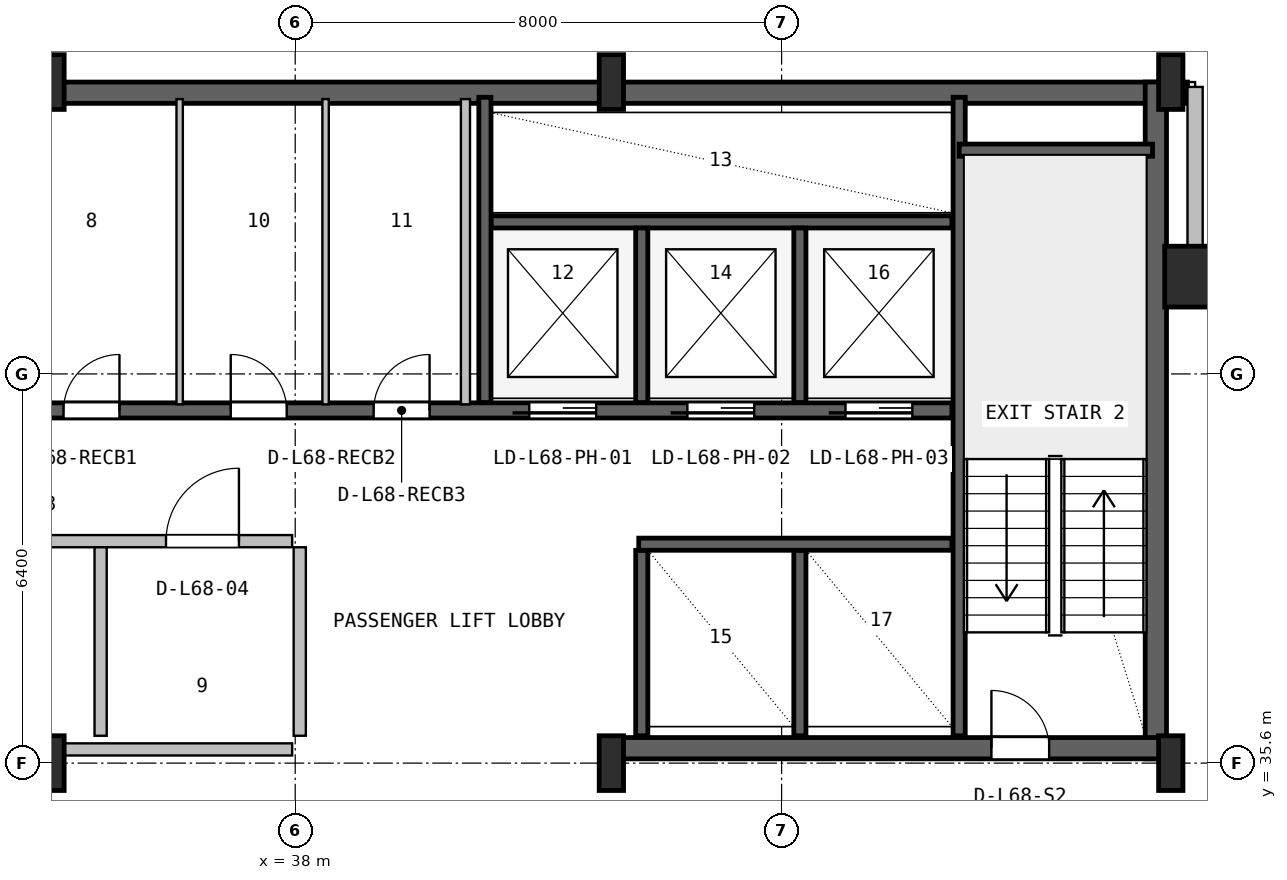
"""IFC4 building model, lengths in metres.
Left out: names, types, materials, properties, quantities, classifications, styles, units other than length and angle.
Written with IfcOpenShell. Run it as: python <this file> out.ifc"""

import sys

from ifc_helpers import new_model, si_unit, direction, frame, frame_2d, origin, origin_2d, place, context, subcontext, project, spatial, rectangle, hollow_rectangle, i_section, extrude, source, transform, mapped, element, fill, save


model = new_model("IFC4")
c1 = context("Model", 3, precision=1e-05, world=origin(), true_north=direction((0.0, 1.0)))
c2 = subcontext(c1, "Body", "Model", "MODEL_VIEW")
j1 = project(units=[si_unit("LENGTHUNIT", "METRE"), si_unit("PLANEANGLEUNIT", "RADIAN")], contexts=[c1])
p1 = place(None, origin())
s1 = spatial("IfcSite", under=j1, at=p1, CompositionType="ELEMENT")
p2 = place(p1, origin())
s2 = spatial("IfcBuilding", under=s1, at=p2, CompositionType="ELEMENT")
p3 = place(p2, frame((0.0, 0.0, 273.6)))
s3 = spatial("IfcBuildingStorey", under=s2, at=p3, CompositionType="ELEMENT", Elevation=273.6)
p4 = place(p3, frame((15.325, 46.625, 0.0), z_axis=(0.0, 0.0, 1.0), x_axis=(1.0, 0.0, 0.0)))
e1 = element("IfcWall", 1, at=p4, inside=s3, PredefinedType="SHEAR", context=c2, shape_type="SweptSolid", body=[
    extrude(rectangle(XDim=37.35, YDim=0.35, at=frame_2d((18.675, 0.0))), origin(), (0.0, 0.0, 1.0), 3.55),
])
p5 = place(p3, frame((52.155, 35.67, 0.0), z_axis=(0.0, 0.0, 1.0), x_axis=(0.0, 1.0, 0.0)))
e2 = element("IfcWall", 2, at=p5, inside=s3, PredefinedType="SHEAR", context=c2, shape_type="SweptSolid", body=[
    extrude(rectangle(XDim=11.13, YDim=0.35, at=frame_2d((5.565, 0.0))), origin(), (0.0, 0.0, 1.0), 3.55),
])
p6 = place(p3, frame((43.2, 35.845, 0.0), z_axis=(0.0, 0.0, 1.0), x_axis=(1.0, 0.0, 0.0)))
e3 = element("IfcWall", 3, at=p6, inside=s3, PredefinedType="SHEAR", context=c2, shape_type="SweptSolid", body=[
    extrude(rectangle(XDim=9.13, YDim=0.35, at=frame_2d((4.565, 0.0))), origin(), (0.0, 0.0, 1.0), 3.55),
])
p7 = place(p6, frame((6.25, 0.0, 0.0)))
e4 = element("IfcOpeningElement", 4, at=p7, cuts=e3, PredefinedType="OPENING", context=c2, shape_type="SweptSolid", body=[
    extrude(rectangle(XDim=0.95, YDim=2.1, at=frame_2d((0.475, 1.05))), frame((0.0, 0.185, 0.0), z_axis=(0.0, -1.0, 0.0), x_axis=(1.0, 0.0, 0.0)), (0.0, 0.0, 1.0), 0.37),
])
m1 = source(origin(), c2, "Body", "SweptSolid", [
    extrude(i_section(OverallWidth=0.4, OverallDepth=0.9, WebThickness=0.016, FlangeThickness=0.028, FilletRadius=0.016, at=origin_2d()), origin(), (0.0, 0.0, 1.0), 3.8),
])
for number, where, z_axis, x_axis in (
    (5, (34.0, 35.6, 0.0), (0.0, 0.0, 1.0), (1.0, 0.0, 0.0)),
    (6, (34.0, 46.8, 0.0), (0.0, 0.0, 1.0), (1.0, 0.0, 0.0)),
    (7, (43.2, 35.6, 0.0), (0.0, 0.0, 1.0), (1.0, 0.0, 0.0)),
    (8, (43.2, 46.8, 0.0), (0.0, 0.0, 1.0), (1.0, 0.0, 0.0)),
    (9, (52.4, 35.6, 0.0), (0.0, 0.0, 1.0), (1.0, 0.0, 0.0)),
    (10, (52.4, 46.8, 0.0), (0.0, 0.0, 1.0), (1.0, 0.0, 0.0)),
):
    element("IfcColumn", number, at=place(p3, frame(where, z_axis=z_axis, x_axis=x_axis)), inside=s3, PredefinedType="COLUMN", context=c2, shape_type="MappedRepresentation", body=[
        mapped(m1, transform((0.0, 0.0, 0.0), x_axis=(1.0, 0.0, 0.0), y_axis=(0.0, 1.0, 0.0), z_axis=(0.0, 0.0, 1.0), scale=1.0)),
    ])
m2 = source(origin(), c2, "Body", "SweptSolid", [
    extrude(hollow_rectangle(XDim=1.0, YDim=1.0, WallThickness=0.04, at=origin_2d()), origin(), (0.0, 0.0, 1.0), 3.8),
])
p8 = place(p3, frame((52.8, 43.6, 0.0), z_axis=(0.0, 0.0, 1.0), x_axis=(1.0, 0.0, 0.0)))
e11 = element("IfcColumn", 11, at=p8, inside=s3, PredefinedType="COLUMN", context=c2, shape_type="MappedRepresentation", body=[
    mapped(m2, transform((0.0, 0.0, 0.0), x_axis=(1.0, 0.0, 0.0), y_axis=(0.0, 1.0, 0.0), z_axis=(0.0, 0.0, 1.0), scale=1.0)),
])
p9 = place(p3, frame((52.93, 43.6, 0.0), z_axis=(0.0, 0.0, 1.0), x_axis=(1.0, 0.0, 0.0)))
e12 = element("IfcWall", 12, at=p9, inside=s3, PredefinedType="SOLIDWALL", context=c2, shape_type="SweptSolid", body=[
    extrude(rectangle(XDim=2.99, YDim=0.25, at=frame_2d((1.495, 0.0))), origin(), (0.0, 0.0, 1.0), 3.53),
])
p10 = place(p3, frame((52.8, 43.52, 0.0), z_axis=(0.0, 0.0, 1.0), x_axis=(0.0, 1.0, 0.0)))
e13 = element("IfcWall", 13, at=p10, inside=s3, PredefinedType="SOLIDWALL", context=c2, shape_type="SweptSolid", body=[
    extrude(rectangle(XDim=3.2, YDim=0.25, at=frame_2d((1.6, 0.0))), origin(), (0.0, 0.0, 1.0), 3.171),
])
p11 = place(p3, frame((48.92, 36.05, 0.0), z_axis=(0.0, 0.0, 1.0), x_axis=(0.0, 1.0, 0.0)))
e14 = element("IfcWall", 14, at=p11, inside=s3, PredefinedType="SHEAR", context=c2, shape_type="SweptSolid", body=[
    extrude(rectangle(XDim=10.5, YDim=0.2, at=frame_2d((5.25, 0.0))), origin(), (0.0, 0.0, 1.0), 3.55),
])
p12 = place(p3, frame((48.92, 45.68, 0.0), z_axis=(0.0, 0.0, 1.0), x_axis=(1.0, 0.0, 0.0)))
e15 = element("IfcWall", 15, at=p12, inside=s3, PredefinedType="SHEAR", context=c2, shape_type="SweptSolid", body=[
    extrude(rectangle(XDim=3.18, YDim=0.2, at=frame_2d((1.59, 0.0))), origin(), (0.0, 0.0, 1.0), 3.55),
])
p13 = place(p3, frame((24.98, 41.4, 0.0), z_axis=(0.0, 0.0, 1.0), x_axis=(1.0, 0.0, 0.0)))
e16 = element("IfcWall", 16, at=p13, inside=s3, PredefinedType="SHEAR", context=c2, shape_type="SweptSolid", body=[
    extrude(rectangle(XDim=23.82, YDim=0.25, at=frame_2d((11.91, 0.0))), origin(), (0.0, 0.0, 1.0), 3.55),
])
p14 = place(p13, frame((16.87, 0.0, 0.0)))
e17 = element("IfcOpeningElement", 17, at=p14, cuts=e16, PredefinedType="OPENING", context=c2, shape_type="SweptSolid", body=[
    extrude(rectangle(XDim=1.1, YDim=2.18, at=frame_2d((0.55, 1.09))), frame((0.0, 0.135, 0.0), z_axis=(0.0, -1.0, 0.0), x_axis=(1.0, 0.0, 0.0)), (0.0, 0.0, 1.0), 0.27),
])
p15 = place(p13, frame((19.47, 0.0, 0.0)))
e18 = element("IfcOpeningElement", 18, at=p15, cuts=e16, PredefinedType="OPENING", context=c2, shape_type="SweptSolid", body=[
    extrude(rectangle(XDim=1.1, YDim=2.18, at=frame_2d((0.55, 1.09))), frame((0.0, 0.135, 0.0), z_axis=(0.0, -1.0, 0.0), x_axis=(1.0, 0.0, 0.0)), (0.0, 0.0, 1.0), 0.27),
])
p16 = place(p13, frame((22.07, 0.0, 0.0)))
e19 = element("IfcOpeningElement", 19, at=p16, cuts=e16, PredefinedType="OPENING", context=c2, shape_type="SweptSolid", body=[
    extrude(rectangle(XDim=1.1, YDim=2.18, at=frame_2d((0.55, 1.09))), frame((0.0, 0.135, 0.0), z_axis=(0.0, -1.0, 0.0), x_axis=(1.0, 0.0, 0.0)), (0.0, 0.0, 1.0), 0.27),
])
p17 = place(p13, frame((1.81, 0.0, 0.0)))
e20 = element("IfcOpeningElement", 20, at=p17, cuts=e16, PredefinedType="OPENING", context=c2, shape_type="SweptSolid", body=[
    extrude(rectangle(XDim=0.92, YDim=2.08, at=frame_2d((0.46, 1.04))), frame((0.0, 0.135, 0.0), z_axis=(0.0, -1.0, 0.0), x_axis=(1.0, 0.0, 0.0)), (0.0, 0.0, 1.0), 0.27),
])
p18 = place(p13, frame((5.71, 0.0, 0.0)))
e21 = element("IfcOpeningElement", 21, at=p18, cuts=e16, PredefinedType="OPENING", context=c2, shape_type="SweptSolid", body=[
    extrude(rectangle(XDim=0.92, YDim=2.08, at=frame_2d((0.46, 1.04))), frame((0.0, 0.135, 0.0), z_axis=(0.0, -1.0, 0.0), x_axis=(1.0, 0.0, 0.0)), (0.0, 0.0, 1.0), 0.27),
])
p19 = place(p13, frame((9.21, 0.0, 0.0)))
e22 = element("IfcOpeningElement", 22, at=p19, cuts=e16, PredefinedType="OPENING", context=c2, shape_type="SweptSolid", body=[
    extrude(rectangle(XDim=0.92, YDim=2.08, at=frame_2d((0.46, 1.04))), frame((0.0, 0.135, 0.0), z_axis=(0.0, -1.0, 0.0), x_axis=(1.0, 0.0, 0.0)), (0.0, 0.0, 1.0), 0.27),
])
p20 = place(p13, frame((11.96, 0.0, 0.0)))
e23 = element("IfcOpeningElement", 23, at=p20, cuts=e16, PredefinedType="OPENING", context=c2, shape_type="SweptSolid", body=[
    extrude(rectangle(XDim=0.92, YDim=2.08, at=frame_2d((0.46, 1.04))), frame((0.0, 0.135, 0.0), z_axis=(0.0, -1.0, 0.0), x_axis=(1.0, 0.0, 0.0)), (0.0, 0.0, 1.0), 0.27),
])
p21 = place(p13, frame((14.31, 0.0, 0.0)))
e24 = element("IfcOpeningElement", 24, at=p21, cuts=e16, PredefinedType="OPENING", context=c2, shape_type="SweptSolid", body=[
    extrude(rectangle(XDim=0.92, YDim=2.08, at=frame_2d((0.46, 1.04))), frame((0.0, 0.135, 0.0), z_axis=(0.0, -1.0, 0.0), x_axis=(1.0, 0.0, 0.0)), (0.0, 0.0, 1.0), 0.27),
])
p22 = place(p3, frame((41.22, 44.5, 0.0), z_axis=(0.0, 0.0, 1.0), x_axis=(1.0, 0.0, 0.0)))
e25 = element("IfcWall", 25, at=p22, inside=s3, PredefinedType="SHEAR", context=c2, shape_type="SweptSolid", body=[
    extrude(rectangle(XDim=7.58, YDim=0.2, at=frame_2d((3.79, 0.0))), origin(), (0.0, 0.0, 1.0), 3.55),
])
p23 = place(p3, frame((41.12, 41.53, 0.0), z_axis=(0.0, 0.0, 1.0), x_axis=(0.0, 1.0, 0.0)))
e26 = element("IfcWall", 26, at=p23, inside=s3, PredefinedType="SHEAR", context=c2, shape_type="SweptSolid", body=[
    extrude(rectangle(XDim=5.02, YDim=0.2, at=frame_2d((2.51, 0.0))), origin(), (0.0, 0.0, 1.0), 3.55),
])
for number, where, z_axis, x_axis in (
    (27, (43.7, 41.53, 0.0), (0.0, 0.0, 1.0), (0.0, 1.0, 0.0)),
    (28, (46.3, 41.53, 0.0), (0.0, 0.0, 1.0), (0.0, 1.0, 0.0)),
):
    element("IfcWall", number, at=place(p3, frame(where, z_axis=z_axis, x_axis=x_axis)), inside=s3, PredefinedType="SHEAR", context=c2, shape_type="SweptSolid", body=[
        extrude(rectangle(XDim=2.87, YDim=0.2, at=frame_2d((1.435, 0.0))), origin(), (0.0, 0.0, 1.0), 3.55),
    ])
for number, where, z_axis, x_axis in (
    (29, (43.7, 36.05, 0.0), (0.0, 0.0, 1.0), (0.0, 1.0, 0.0)),
    (30, (46.3, 36.05, 0.0), (0.0, 0.0, 1.0), (0.0, 1.0, 0.0)),
):
    element("IfcWall", number, at=place(p3, frame(where, z_axis=z_axis, x_axis=x_axis)), inside=s3, PredefinedType="SHEAR", context=c2, shape_type="SweptSolid", body=[
        extrude(rectangle(XDim=3.05, YDim=0.2, at=frame_2d((1.525, 0.0))), origin(), (0.0, 0.0, 1.0), 3.55),
    ])
p24 = place(p3, frame((43.65, 39.2, 0.0), z_axis=(0.0, 0.0, 1.0), x_axis=(1.0, 0.0, 0.0)))
e31 = element("IfcWall", 31, at=p24, inside=s3, PredefinedType="SHEAR", context=c2, shape_type="SweptSolid", body=[
    extrude(rectangle(XDim=5.15, YDim=0.2, at=frame_2d((2.575, 0.0))), origin(), (0.0, 0.0, 1.0), 3.55),
])
p25 = place(p3, frame((25.0, 35.825, 0.0), z_axis=(0.0, 0.0, 1.0), x_axis=(1.0, 0.0, 0.0)))
e32 = element("IfcWall", 32, at=p25, inside=s3, PredefinedType="SOLIDWALL", context=c2, shape_type="SweptSolid", body=[
    extrude(rectangle(XDim=12.95, YDim=0.2, at=frame_2d((6.475, 0.0))), origin(), (0.0, 0.0, 1.0), 2.575),
])
p26 = place(p3, frame((25.0, 39.25, 0.0), z_axis=(0.0, 0.0, 1.0), x_axis=(1.0, 0.0, 0.0)))
e33 = element("IfcWall", 33, at=p26, inside=s3, PredefinedType="SOLIDWALL", context=c2, shape_type="SweptSolid", body=[
    extrude(rectangle(XDim=12.95, YDim=0.2, at=frame_2d((6.475, 0.0))), origin(), (0.0, 0.0, 1.0), 3.53),
])
p27 = place(p26, frame((1.1, 0.0, 0.0)))
e34 = element("IfcOpeningElement", 34, at=p27, cuts=e33, PredefinedType="OPENING", context=c2, shape_type="SweptSolid", body=[
    extrude(rectangle(XDim=0.9, YDim=2.06, at=frame_2d((0.45, 1.03))), frame((0.0, 0.11, 0.0), z_axis=(0.0, -1.0, 0.0), x_axis=(1.0, 0.0, 0.0)), (0.0, 0.0, 1.0), 0.22),
])
p28 = place(p26, frame((4.5, 0.0, 0.0)))
e35 = element("IfcOpeningElement", 35, at=p28, cuts=e33, PredefinedType="OPENING", context=c2, shape_type="SweptSolid", body=[
    extrude(rectangle(XDim=0.9, YDim=2.06, at=frame_2d((0.45, 1.03))), frame((0.0, 0.11, 0.0), z_axis=(0.0, -1.0, 0.0), x_axis=(1.0, 0.0, 0.0)), (0.0, 0.0, 1.0), 0.22),
])
p29 = place(p26, frame((7.84, 0.0, 0.0)))
e36 = element("IfcOpeningElement", 36, at=p29, cuts=e33, PredefinedType="OPENING", context=c2, shape_type="SweptSolid", body=[
    extrude(rectangle(XDim=0.92, YDim=2.08, at=frame_2d((0.46, 1.04))), frame((0.0, 0.11, 0.0), z_axis=(0.0, -1.0, 0.0), x_axis=(1.0, 0.0, 0.0)), (0.0, 0.0, 1.0), 0.22),
])
p30 = place(p26, frame((10.875, 0.0, 0.0)))
e37 = element("IfcOpeningElement", 37, at=p30, cuts=e33, PredefinedType="OPENING", context=c2, shape_type="SweptSolid", body=[
    extrude(rectangle(XDim=1.2, YDim=2.1, at=frame_2d((0.6, 1.05))), frame((0.0, 0.11, 0.0), z_axis=(0.0, -1.0, 0.0), x_axis=(1.0, 0.0, 0.0)), (0.0, 0.0, 1.0), 0.22),
])
for number, where, z_axis, x_axis in (
    (38, (34.8, 36.05, 0.0), (0.0, 0.0, 1.0), (0.0, 1.0, 0.0)),
    (39, (38.075, 36.05, 0.0), (0.0, 0.0, 1.0), (0.0, 1.0, 0.0)),
):
    element("IfcWall", number, at=place(p3, frame(where, z_axis=z_axis, x_axis=x_axis)), inside=s3, PredefinedType="SOLIDWALL", context=c2, shape_type="SweptSolid", body=[
        extrude(rectangle(XDim=3.1, YDim=0.2, at=frame_2d((1.55, 0.0))), origin(), (0.0, 0.0, 1.0), 3.53),
    ])
for number, where, z_axis, x_axis in (
    (40, (36.1, 41.5, 0.0), (0.0, 0.0, 1.0), (0.0, 1.0, 0.0)),
    (41, (38.5, 41.5, 0.0), (0.0, 0.0, 1.0), (0.0, 1.0, 0.0)),
):
    element("IfcWall", number, at=place(p3, frame(where, z_axis=z_axis, x_axis=x_axis)), inside=s3, PredefinedType="PARTITIONING", context=c2, shape_type="SweptSolid", body=[
        extrude(rectangle(XDim=5.02, YDim=0.105, at=frame_2d((2.51, 0.0))), origin(), (0.0, 0.0, 1.0), 3.53),
    ])
p31 = place(p3, frame((40.8, 41.5, 0.0), z_axis=(0.0, 0.0, 1.0), x_axis=(0.0, 1.0, 0.0)))
e42 = element("IfcWall", 42, at=p31, inside=s3, PredefinedType="PARTITIONING", context=c2, shape_type="SweptSolid", body=[
    extrude(rectangle(XDim=5.02, YDim=0.15, at=frame_2d((2.51, 0.0))), origin(), (0.0, 0.0, 1.0), 3.53),
])
m3 = source(origin(), c2, "Body", "SweptSolid", [
    extrude(rectangle(XDim=0.95, YDim=2.1, at=frame_2d((0.475, 1.05))), frame((0.0, 0.025, 0.0), z_axis=(0.0, -1.0, 0.0), x_axis=(1.0, 0.0, 0.0)), (0.0, 0.0, 1.0), 0.05),
])
p32 = place(p7, origin())
e43 = element("IfcDoor", 43, at=p32, inside=s3, OperationType="SINGLE_SWING_LEFT", PredefinedType="DOOR", context=c2, shape_type="MappedRepresentation", body=[
    mapped(m3, transform((0.0, 0.0, 0.0), x_axis=(1.0, 0.0, 0.0), y_axis=(0.0, 1.0, 0.0), z_axis=(0.0, 0.0, 1.0), scale=1.0)),
])
fill(e4, e43)
m4 = source(origin(), c2, "Body", "SweptSolid", [
    extrude(rectangle(XDim=1.1, YDim=2.18, at=frame_2d((0.55, 1.09))), frame((0.0, 0.025, 0.0), z_axis=(0.0, -1.0, 0.0), x_axis=(1.0, 0.0, 0.0)), (0.0, 0.0, 1.0), 0.05),
])
p33 = place(p14, frame((1.1, 0.0, 0.0), z_axis=(0.0, 0.0, 1.0), x_axis=(-1.0, 0.0, 0.0)))
e44 = element("IfcDoor", 44, at=p33, inside=s3, OperationType="SLIDING_TO_LEFT", PredefinedType="DOOR", context=c2, shape_type="MappedRepresentation", body=[
    mapped(m4, transform((0.0, 0.0, 0.0), x_axis=(1.0, 0.0, 0.0), y_axis=(0.0, 1.0, 0.0), z_axis=(0.0, 0.0, 1.0), scale=1.0)),
])
fill(e17, e44)
p34 = place(p15, frame((1.1, 0.0, 0.0), z_axis=(0.0, 0.0, 1.0), x_axis=(-1.0, 0.0, 0.0)))
e45 = element("IfcDoor", 45, at=p34, inside=s3, OperationType="SLIDING_TO_LEFT", PredefinedType="DOOR", context=c2, shape_type="MappedRepresentation", body=[
    mapped(m4, transform((0.0, 0.0, 0.0), x_axis=(1.0, 0.0, 0.0), y_axis=(0.0, 1.0, 0.0), z_axis=(0.0, 0.0, 1.0), scale=1.0)),
])
fill(e18, e45)
p35 = place(p16, frame((1.1, 0.0, 0.0), z_axis=(0.0, 0.0, 1.0), x_axis=(-1.0, 0.0, 0.0)))
e46 = element("IfcDoor", 46, at=p35, inside=s3, OperationType="SLIDING_TO_LEFT", PredefinedType="DOOR", context=c2, shape_type="MappedRepresentation", body=[
    mapped(m4, transform((0.0, 0.0, 0.0), x_axis=(1.0, 0.0, 0.0), y_axis=(0.0, 1.0, 0.0), z_axis=(0.0, 0.0, 1.0), scale=1.0)),
])
fill(e19, e46)
m5 = source(origin(), c2, "Body", "SweptSolid", [
    extrude(rectangle(XDim=0.92, YDim=2.08, at=frame_2d((0.46, 1.04))), frame((0.0, 0.025, 0.0), z_axis=(0.0, -1.0, 0.0), x_axis=(1.0, 0.0, 0.0)), (0.0, 0.0, 1.0), 0.05),
])
p36 = place(p19, origin())
e47 = element("IfcDoor", 47, at=p36, inside=s3, OperationType="SINGLE_SWING_RIGHT", PredefinedType="DOOR", context=c2, shape_type="MappedRepresentation", body=[
    mapped(m5, transform((0.0, 0.0, 0.0), x_axis=(1.0, 0.0, 0.0), y_axis=(0.0, 1.0, 0.0), z_axis=(0.0, 0.0, 1.0), scale=1.0)),
])
fill(e22, e47)
p37 = place(p20, origin())
e48 = element("IfcDoor", 48, at=p37, inside=s3, OperationType="SINGLE_SWING_LEFT", PredefinedType="DOOR", context=c2, shape_type="MappedRepresentation", body=[
    mapped(m5, transform((0.0, 0.0, 0.0), x_axis=(1.0, 0.0, 0.0), y_axis=(0.0, 1.0, 0.0), z_axis=(0.0, 0.0, 1.0), scale=1.0)),
])
fill(e23, e48)
p38 = place(p21, origin())
e49 = element("IfcDoor", 49, at=p38, inside=s3, OperationType="SINGLE_SWING_RIGHT", PredefinedType="DOOR", context=c2, shape_type="MappedRepresentation", body=[
    mapped(m5, transform((0.0, 0.0, 0.0), x_axis=(1.0, 0.0, 0.0), y_axis=(0.0, 1.0, 0.0), z_axis=(0.0, 0.0, 1.0), scale=1.0)),
])
fill(e24, e49)
m6 = source(origin(), c2, "Body", "SweptSolid", [
    extrude(rectangle(XDim=1.2, YDim=2.1, at=frame_2d((0.6, 1.05))), frame((0.0, 0.025, 0.0), z_axis=(0.0, -1.0, 0.0), x_axis=(1.0, 0.0, 0.0)), (0.0, 0.0, 1.0), 0.05),
])
p39 = place(p30, origin())
e50 = element("IfcDoor", 50, at=p39, inside=s3, OperationType="SINGLE_SWING_RIGHT", PredefinedType="DOOR", context=c2, shape_type="MappedRepresentation", body=[
    mapped(m6, transform((0.0, 0.0, 0.0), x_axis=(1.0, 0.0, 0.0), y_axis=(0.0, 1.0, 0.0), z_axis=(0.0, 0.0, 1.0), scale=1.0)),
])
fill(e37, e50)
save(model, sys.argv[1])
